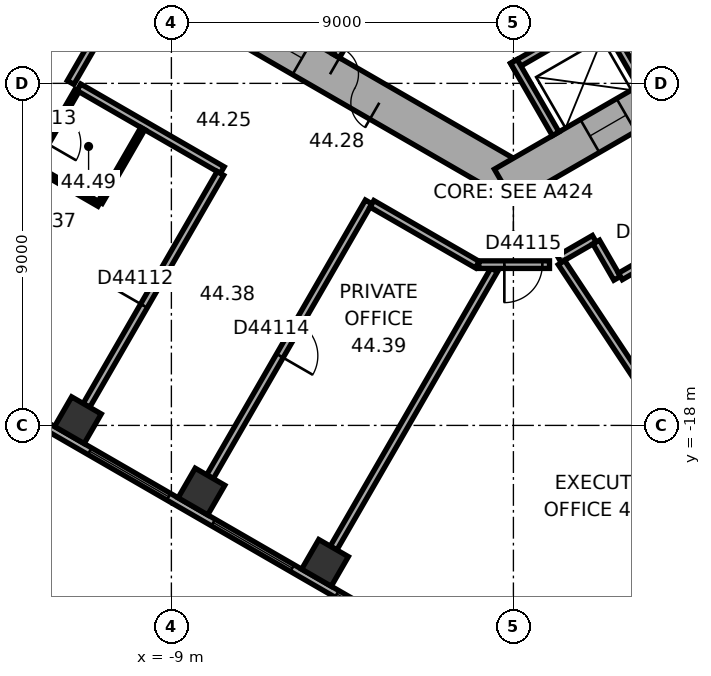
"""IFC4 building model, lengths in metres.
Left out: names, types, materials, properties, quantities, classifications, styles, units other than length and angle.
Written with IfcOpenShell. Run it as: python <this file> out.ifc"""

import sys

from ifc_helpers import new_model, si_unit, direction, frame, frame_2d, origin, origin_2d, place, context, subcontext, project, spatial, rectangle, extrude, element, fill, save


model = new_model("IFC4")
c1 = context("Model", 3, precision=1e-05, world=origin(), true_north=direction((0.0, 1.0)))
c2 = subcontext(c1, "Body", "Model", "MODEL_VIEW")
j1 = project(units=[si_unit("LENGTHUNIT", "METRE"), si_unit("PLANEANGLEUNIT", "RADIAN")], contexts=[c1])
p1 = place(None, origin())
s1 = spatial("IfcSite", under=j1, at=p1, CompositionType="ELEMENT")
p2 = place(p1, origin())
s2 = spatial("IfcBuilding", under=s1, at=p2, CompositionType="ELEMENT")
p3 = place(p2, frame((0.0, 0.0, 179.9)))
s3 = spatial("IfcBuildingStorey", under=s2, at=p3, CompositionType="ELEMENT", Elevation=179.9)
for number, where, z_axis, x_axis in (
    (1, (-11.46, -17.863, 0.0), (0.0, 0.0, 1.0), (0.866, -0.5, 0.0)),
    (2, (-8.208, -19.74, 0.0), (0.0, 0.0, 1.0), (0.866, -0.5, 0.0)),
    (3, (-4.958, -21.617, 0.0), (0.0, 0.0, 1.0), (0.866, -0.5, 0.0)),
):
    element("IfcColumn", number, at=place(p3, frame(where, z_axis=z_axis, x_axis=x_axis)), inside=s3, PredefinedType="COLUMN", context=c2, shape_type="SweptSolid", body=[
        extrude(rectangle(XDim=0.9, YDim=0.9, at=origin_2d()), origin(), (0.0, 0.0, 1.0), 3.7),
    ])
p4 = place(p3, frame((-10.25, -5.629, 0.0), z_axis=(0.0, 0.0, 1.0), x_axis=(0.866022616891, -0.50000482701, 0.0)))
e4 = element("IfcWall", 4, at=p4, inside=s3, PredefinedType="SHEAR", context=c2, shape_type="SweptSolid", body=[
    extrude(rectangle(XDim=12.125, YDim=1.0, at=frame_2d((6.062, 0.0))), origin(), (0.0, 0.0, 1.0), 3.7),
])
p5 = place(p4, frame((6.262, 0.0, 0.0)))
e5 = element("IfcOpeningElement", 5, at=p5, cuts=e4, PredefinedType="OPENING", context=c2, shape_type="SweptSolid", body=[
    extrude(rectangle(XDim=1.5, YDim=2.1, at=frame_2d((0.75, 1.05))), frame((0.0, 0.51, 0.0), z_axis=(0.0, -1.0, 0.0), x_axis=(1.0, 0.0, 0.0)), (0.0, 0.0, 1.0), 1.02),
])
p6 = place(p4, frame((1.712, 0.0, 0.0)))
e6 = element("IfcOpeningElement", 6, at=p6, cuts=e4, PredefinedType="OPENING", context=c2, shape_type="SweptSolid", body=[
    extrude(rectangle(XDim=1.1, YDim=2.1, at=frame_2d((0.55, 1.05))), frame((0.0, 0.51, 0.0), z_axis=(0.0, -1.0, 0.0), x_axis=(1.0, 0.0, 0.0)), (0.0, 0.0, 1.0), 1.02),
])
p7 = place(p4, frame((4.312, 0.0, 0.0)))
e7 = element("IfcOpeningElement", 7, at=p7, cuts=e4, PredefinedType="OPENING", context=c2, shape_type="SweptSolid", body=[
    extrude(rectangle(XDim=1.1, YDim=2.1, at=frame_2d((0.55, 1.05))), frame((0.0, 0.51, 0.0), z_axis=(0.0, -1.0, 0.0), x_axis=(1.0, 0.0, 0.0)), (0.0, 0.0, 1.0), 1.02),
])
p8 = place(p3, frame((-0.25, -11.691, 0.0), z_axis=(0.0, 0.0, 1.0), x_axis=(0.866022616891, 0.50000482701, 0.0)))
e8 = element("IfcWall", 8, at=p8, inside=s3, PredefinedType="SHEAR", context=c2, shape_type="SweptSolid", body=[
    extrude(rectangle(XDim=12.125, YDim=1.0, at=frame_2d((6.062, 0.0))), origin(), (0.0, 0.0, 1.0), 3.7),
])
p9 = place(p8, frame((2.612, 0.0, 0.0)))
e9 = element("IfcOpeningElement", 9, at=p9, cuts=e8, PredefinedType="OPENING", context=c2, shape_type="SweptSolid", body=[
    extrude(rectangle(XDim=1.1, YDim=2.1, at=frame_2d((0.55, 1.05))), frame((0.0, 0.51, 0.0), z_axis=(0.0, -1.0, 0.0), x_axis=(1.0, 0.0, 0.0)), (0.0, 0.0, 1.0), 1.02),
])
p10 = place(p8, frame((5.212, 0.0, 0.0)))
e10 = element("IfcOpeningElement", 10, at=p10, cuts=e8, PredefinedType="OPENING", context=c2, shape_type="SweptSolid", body=[
    extrude(rectangle(XDim=1.1, YDim=2.1, at=frame_2d((0.55, 1.05))), frame((0.0, 0.51, 0.0), z_axis=(0.0, -1.0, 0.0), x_axis=(1.0, 0.0, 0.0)), (0.0, 0.0, 1.0), 1.02),
])
p11 = place(p8, frame((7.812, 0.0, 0.0)))
e11 = element("IfcOpeningElement", 11, at=p11, cuts=e8, PredefinedType="OPENING", context=c2, shape_type="SweptSolid", body=[
    extrude(rectangle(XDim=1.1, YDim=2.1, at=frame_2d((0.55, 1.05))), frame((0.0, 0.51, 0.0), z_axis=(0.0, -1.0, 0.0), x_axis=(1.0, 0.0, 0.0)), (0.0, 0.0, 1.0), 1.02),
])
p12 = place(p3, frame((-18.789, -14.267, 0.0), z_axis=(0.0, 0.0, 1.0), x_axis=(0.866023315909, -0.500003616288, 0.0)))
e12 = element("IfcWall", 12, at=p12, inside=s3, PredefinedType="STANDARD", context=c2, shape_type="SweptSolid", body=[
    extrude(rectangle(XDim=20.044, YDim=0.2, at=frame_2d((10.022, 0.0))), origin(), (0.0, 0.0, 1.0), 3.7),
])
p13 = place(p12, frame((1.314, 0.0, 0.9)))
e13 = element("IfcOpeningElement", 13, at=p13, cuts=e12, PredefinedType="OPENING", context=c2, shape_type="SweptSolid", body=[
    extrude(rectangle(XDim=2.4, YDim=2.0, at=frame_2d((1.2, 1.0))), frame((0.0, 0.11, 0.0), z_axis=(0.0, -1.0, 0.0), x_axis=(1.0, 0.0, 0.0)), (0.0, 0.0, 1.0), 0.22),
])
p14 = place(p12, frame((5.069, 0.0, 0.9)))
e14 = element("IfcOpeningElement", 14, at=p14, cuts=e12, PredefinedType="OPENING", context=c2, shape_type="SweptSolid", body=[
    extrude(rectangle(XDim=2.4, YDim=2.0, at=frame_2d((1.2, 1.0))), frame((0.0, 0.11, 0.0), z_axis=(0.0, -1.0, 0.0), x_axis=(1.0, 0.0, 0.0)), (0.0, 0.0, 1.0), 0.22),
])
p15 = place(p12, frame((8.823, 0.0, 0.9)))
e15 = element("IfcOpeningElement", 15, at=p15, cuts=e12, PredefinedType="OPENING", context=c2, shape_type="SweptSolid", body=[
    extrude(rectangle(XDim=2.4, YDim=2.0, at=frame_2d((1.2, 1.0))), frame((0.0, 0.11, 0.0), z_axis=(0.0, -1.0, 0.0), x_axis=(1.0, 0.0, 0.0)), (0.0, 0.0, 1.0), 0.22),
])
p16 = place(p12, frame((12.577, 0.0, 0.9)))
e16 = element("IfcOpeningElement", 16, at=p16, cuts=e12, PredefinedType="OPENING", context=c2, shape_type="SweptSolid", body=[
    extrude(rectangle(XDim=2.4, YDim=2.0, at=frame_2d((1.2, 1.0))), frame((0.0, 0.11, 0.0), z_axis=(0.0, -1.0, 0.0), x_axis=(1.0, 0.0, 0.0)), (0.0, 0.0, 1.0), 0.22),
])
p17 = place(p12, frame((16.331, 0.0, 0.9)))
e17 = element("IfcOpeningElement", 17, at=p17, cuts=e12, PredefinedType="OPENING", context=c2, shape_type="SweptSolid", body=[
    extrude(rectangle(XDim=2.4, YDim=2.0, at=frame_2d((1.2, 1.0))), frame((0.0, 0.11, 0.0), z_axis=(0.0, -1.0, 0.0), x_axis=(1.0, 0.0, 0.0)), (0.0, 0.0, 1.0), 0.22),
])
p18 = place(p3, frame((2.911, -24.156, 0.0), z_axis=(0.0, 0.0, 1.0), x_axis=(0.833882163564, 0.551942512668, 0.0)))
e18 = element("IfcWall", 18, at=p18, inside=s3, PredefinedType="STANDARD", context=c2, shape_type="SweptSolid", body=[
    extrude(rectangle(XDim=20.044, YDim=0.2, at=frame_2d((10.022, 0.0))), origin(), (0.0, 0.0, 1.0), 3.7),
])
p19 = place(p18, frame((1.313, 0.0, 0.9)))
e19 = element("IfcOpeningElement", 19, at=p19, cuts=e18, PredefinedType="OPENING", context=c2, shape_type="SweptSolid", body=[
    extrude(rectangle(XDim=2.4, YDim=2.0, at=frame_2d((1.2, 1.0))), frame((0.0, 0.11, 0.0), z_axis=(0.0, -1.0, 0.0), x_axis=(1.0, 0.0, 0.0)), (0.0, 0.0, 1.0), 0.22),
])
p20 = place(p18, frame((5.067, 0.0, 0.9)))
e20 = element("IfcOpeningElement", 20, at=p20, cuts=e18, PredefinedType="OPENING", context=c2, shape_type="SweptSolid", body=[
    extrude(rectangle(XDim=2.4, YDim=2.0, at=frame_2d((1.2, 1.0))), frame((0.0, 0.11, 0.0), z_axis=(0.0, -1.0, 0.0), x_axis=(1.0, 0.0, 0.0)), (0.0, 0.0, 1.0), 0.22),
])
p21 = place(p18, frame((8.821, 0.0, 0.9)))
e21 = element("IfcOpeningElement", 21, at=p21, cuts=e18, PredefinedType="OPENING", context=c2, shape_type="SweptSolid", body=[
    extrude(rectangle(XDim=2.4, YDim=2.0, at=frame_2d((1.2, 1.0))), frame((0.0, 0.11, 0.0), z_axis=(0.0, -1.0, 0.0), x_axis=(1.0, 0.0, 0.0)), (0.0, 0.0, 1.0), 0.22),
])
p22 = place(p18, frame((12.575, 0.0, 0.9)))
e22 = element("IfcOpeningElement", 22, at=p22, cuts=e18, PredefinedType="OPENING", context=c2, shape_type="SweptSolid", body=[
    extrude(rectangle(XDim=2.4, YDim=2.0, at=frame_2d((1.2, 1.0))), frame((0.0, 0.11, 0.0), z_axis=(0.0, -1.0, 0.0), x_axis=(1.0, 0.0, 0.0)), (0.0, 0.0, 1.0), 0.22),
])
p23 = place(p18, frame((16.329, 0.0, 0.9)))
e23 = element("IfcOpeningElement", 23, at=p23, cuts=e18, PredefinedType="OPENING", context=c2, shape_type="SweptSolid", body=[
    extrude(rectangle(XDim=2.4, YDim=2.0, at=frame_2d((1.2, 1.0))), frame((0.0, 0.11, 0.0), z_axis=(0.0, -1.0, 0.0), x_axis=(1.0, 0.0, 0.0)), (0.0, 0.0, 1.0), 0.22),
])
p24 = place(p3, frame((-3.563, -6.372, 0.0), z_axis=(0.0, 0.0, 1.0), x_axis=(-0.499994660107, -0.866028486751, 0.0)))
e24 = element("IfcWall", 24, at=p24, inside=s3, PredefinedType="PARTITIONING", context=c2, shape_type="SweptSolid", body=[
    extrude(rectangle(XDim=2.2, YDim=0.2, at=frame_2d((1.1, 0.0))), origin(), (0.0, 0.0, 1.0), 3.42),
])
p25 = place(p3, frame((-0.024, -8.559, 0.0), z_axis=(0.0, 0.0, 1.0), x_axis=(0.866026010844, 0.49999894854, 0.0)))
e25 = element("IfcWall", 25, at=p25, inside=s3, PredefinedType="PARTITIONING", context=c2, shape_type="SweptSolid", body=[
    extrude(rectangle(XDim=8.0, YDim=0.2, at=frame_2d((4.0, 0.0))), origin(), (0.0, 0.0, 1.0), 3.42),
])
for number, where, z_axis, x_axis in (
    (26, (0.013, -8.422, 0.0), (0.0, 0.0, 1.0), (0.5, -0.866, 0.0)),
    (27, (2.264, -7.122, 0.0), (0.0, 0.0, 1.0), (0.5, -0.866, 0.0)),
):
    element("IfcWall", number, at=place(p3, frame(where, z_axis=z_axis, x_axis=x_axis)), inside=s3, PredefinedType="PARTITIONING", context=c2, shape_type="SweptSolid", body=[
        extrude(rectangle(XDim=2.2, YDim=0.2, at=frame_2d((1.1, 0.0))), origin(), (0.0, 0.0, 1.0), 3.42),
    ])
p26 = place(p3, frame((-12.635, -11.182, 0.0), z_axis=(0.0, 0.0, 1.0), x_axis=(0.499952165731, 0.866053019151, 0.0)))
e28 = element("IfcWall", 28, at=p26, inside=s3, PredefinedType="PARTITIONING", context=c2, shape_type="SweptSolid", body=[
    extrude(rectangle(XDim=2.3, YDim=0.12, at=frame_2d((1.15, 0.0))), origin(), (0.0, 0.0, 1.0), 3.42),
])
p27 = place(p26, frame((0.7, 0.0, 0.0)))
e29 = element("IfcOpeningElement", 29, at=p27, cuts=e28, PredefinedType="OPENING", context=c2, shape_type="SweptSolid", body=[
    extrude(rectangle(XDim=0.9, YDim=2.1, at=frame_2d((0.45, 1.05))), frame((0.0, 0.07, 0.0), z_axis=(0.0, -1.0, 0.0), x_axis=(1.0, 0.0, 0.0)), (0.0, 0.0, 1.0), 0.14),
])
p28 = place(p3, frame((-11.435, -9.103, 0.0), z_axis=(0.0, 0.0, 1.0), x_axis=(0.866007399799, -0.500031182522, 0.0)))
e30 = element("IfcWall", 30, at=p28, inside=s3, PredefinedType="PARTITIONING", context=c2, shape_type="SweptSolid", body=[
    extrude(rectangle(XDim=4.358, YDim=0.2, at=frame_2d((2.179, 0.0))), origin(), (0.0, 0.0, 1.0), 3.42),
])
p29 = place(p3, frame((-11.235, -17.474, 0.0), z_axis=(0.0, 0.0, 1.0), x_axis=(0.500009260695, 0.866020057054, 0.0)))
e31 = element("IfcWall", 31, at=p29, inside=s3, PredefinedType="PARTITIONING", context=c2, shape_type="SweptSolid", body=[
    extrude(rectangle(XDim=7.049, YDim=0.2, at=frame_2d((3.524, 0.0))), origin(), (0.0, 0.0, 1.0), 2.87),
])
p30 = place(p29, frame((3.024, 0.0, 0.0)))
e32 = element("IfcOpeningElement", 32, at=p30, cuts=e31, PredefinedType="OPENING", context=c2, shape_type="SweptSolid", body=[
    extrude(rectangle(XDim=1.0, YDim=2.1, at=frame_2d((0.5, 1.05))), frame((0.0, 0.11, 0.0), z_axis=(0.0, -1.0, 0.0), x_axis=(1.0, 0.0, 0.0)), (0.0, 0.0, 1.0), 0.22),
])
p31 = place(p3, frame((-11.101, -8.025, 0.0), z_axis=(0.0, 0.0, 1.0), x_axis=(-0.500074377092, -0.865982457891, 0.0)))
e33 = element("IfcWall", 33, at=p31, inside=s3, PredefinedType="PARTITIONING", context=c2, shape_type="SweptSolid", body=[
    extrude(rectangle(XDim=1.101, YDim=0.2, at=frame_2d((0.55, 0.0))), origin(), (0.0, 0.0, 1.0), 3.42),
])
p32 = place(p3, frame((-10.903, -12.182, 0.0), z_axis=(0.0, 0.0, 1.0), x_axis=(-0.866011626733, 0.500023861795, 0.0)))
e34 = element("IfcWall", 34, at=p32, inside=s3, PredefinedType="PARTITIONING", context=c2, shape_type="SweptSolid", body=[
    extrude(rectangle(XDim=1.94, YDim=0.12, at=frame_2d((0.97, 0.0))), origin(), (0.0, 0.0, 1.0), 3.42),
])
p33 = place(p3, frame((-9.753, -10.19, 0.0), z_axis=(0.0, 0.0, 1.0), x_axis=(-0.49994888933, -0.866054910533, 0.0)))
e35 = element("IfcWall", 35, at=p33, inside=s3, PredefinedType="PARTITIONING", context=c2, shape_type="SweptSolid", body=[
    extrude(rectangle(XDim=2.24, YDim=0.12, at=frame_2d((1.12, 0.0))), origin(), (0.0, 0.0, 1.0), 3.42),
])
p34 = place(p3, frame((-7.984, -19.351, 0.0), z_axis=(0.0, 0.0, 1.0), x_axis=(0.500010139422, 0.866019549707, 0.0)))
e36 = element("IfcWall", 36, at=p34, inside=s3, PredefinedType="PARTITIONING", context=c2, shape_type="SweptSolid", body=[
    extrude(rectangle(XDim=8.35, YDim=0.2, at=frame_2d((4.175, 0.0))), origin(), (0.0, 0.0, 1.0), 3.42),
])
p35 = place(p34, frame((3.675, 0.0, 0.0)))
e37 = element("IfcOpeningElement", 37, at=p35, cuts=e36, PredefinedType="OPENING", context=c2, shape_type="SweptSolid", body=[
    extrude(rectangle(XDim=1.0, YDim=2.1, at=frame_2d((0.5, 1.05))), frame((0.0, 0.11, 0.0), z_axis=(0.0, -1.0, 0.0), x_axis=(1.0, 0.0, 0.0)), (0.0, 0.0, 1.0), 0.22),
])
p36 = place(p3, frame((-4.732, -21.228, 0.0), z_axis=(0.0, 0.0, 1.0), x_axis=(0.500000843414, 0.866024916838, 0.0)))
e38 = element("IfcWall", 38, at=p36, inside=s3, PredefinedType="PARTITIONING", context=c2, shape_type="SweptSolid", body=[
    extrude(rectangle(XDim=8.452, YDim=0.2, at=frame_2d((4.226, 0.0))), origin(), (0.0, 0.0, 1.0), 3.42),
])
p37 = place(p3, frame((-3.722, -12.169, 0.0), z_axis=(0.0, 0.0, 1.0), x_axis=(0.866033163891, -0.499986558861, 0.0)))
e39 = element("IfcWall", 39, at=p37, inside=s3, PredefinedType="PARTITIONING", context=c2, shape_type="SweptSolid", body=[
    extrude(rectangle(XDim=3.201, YDim=0.2, at=frame_2d((1.6, 0.0))), origin(), (0.0, 0.0, 1.0), 3.42),
])
p38 = place(p3, frame((-0.91, -13.77, 0.0), z_axis=(0.0, 0.0, 1.0), x_axis=(1.0, 0.0, 0.0)))
e40 = element("IfcWall", 40, at=p38, inside=s3, PredefinedType="PARTITIONING", context=c2, shape_type="SweptSolid", body=[
    extrude(rectangle(XDim=1.86, YDim=0.2, at=frame_2d((0.93, 0.0))), origin(), (0.0, 0.0, 1.0), 3.42),
])
p39 = place(p38, frame((0.672, 0.0, 0.0)))
e41 = element("IfcOpeningElement", 41, at=p39, cuts=e40, PredefinedType="OPENING", context=c2, shape_type="SweptSolid", body=[
    extrude(rectangle(XDim=1.0, YDim=2.1, at=frame_2d((0.5, 1.05))), frame((0.0, 0.11, 0.0), z_axis=(0.0, -1.0, 0.0), x_axis=(1.0, 0.0, 0.0)), (0.0, 0.0, 1.0), 0.22),
])
p40 = place(p3, frame((1.204, -13.623, 0.0), z_axis=(0.0, 0.0, 1.0), x_axis=(0.866040989419, 0.499973003918, 0.0)))
e42 = element("IfcWall", 42, at=p40, inside=s3, PredefinedType="PARTITIONING", context=c2, shape_type="SweptSolid", body=[
    extrude(rectangle(XDim=1.068, YDim=0.2, at=frame_2d((0.534, 0.0))), origin(), (0.0, 0.0, 1.0), 3.42),
])
p41 = place(p3, frame((2.179, -13.176, 0.0), z_axis=(0.0, 0.0, 1.0), x_axis=(0.499978356969, -0.866037899034, 0.0)))
e43 = element("IfcWall", 43, at=p41, inside=s3, PredefinedType="PARTITIONING", context=c2, shape_type="SweptSolid", body=[
    extrude(rectangle(XDim=1.101, YDim=0.2, at=frame_2d((0.551, 0.0))), origin(), (0.0, 0.0, 1.0), 3.42),
])
p42 = place(p3, frame((2.816, -14.079, 0.0), z_axis=(0.0, 0.0, 1.0), x_axis=(0.866008705299, 0.50002892151, 0.0)))
e44 = element("IfcWall", 44, at=p42, inside=s3, PredefinedType="PARTITIONING", context=c2, shape_type="SweptSolid", body=[
    extrude(rectangle(XDim=2.666, YDim=0.2, at=frame_2d((1.333, 0.0))), origin(), (0.0, 0.0, 1.0), 3.42),
])
p43 = place(p42, frame((0.833, 0.0, 0.0)))
e45 = element("IfcOpeningElement", 45, at=p43, cuts=e44, PredefinedType="OPENING", context=c2, shape_type="SweptSolid", body=[
    extrude(rectangle(XDim=1.0, YDim=2.1, at=frame_2d((0.5, 1.05))), frame((0.0, 0.11, 0.0), z_axis=(0.0, -1.0, 0.0), x_axis=(1.0, 0.0, 0.0)), (0.0, 0.0, 1.0), 0.22),
])
p44 = place(p3, frame((6.02, -20.899, 0.0), z_axis=(0.0, 0.0, 1.0), x_axis=(-0.551943990108, 0.833881185651, 0.0)))
e46 = element("IfcWall", 46, at=p44, inside=s3, PredefinedType="PARTITIONING", context=c2, shape_type="SweptSolid", body=[
    extrude(rectangle(XDim=8.615, YDim=0.2, at=frame_2d((4.308, 0.0))), origin(), (0.0, 0.0, 1.0), 3.42),
])
p45 = place(p15, origin())
e47 = element("IfcWindow", 47, at=p45, inside=s3, PartitioningType="SINGLE_PANEL", PredefinedType="WINDOW", context=c2, shape_type="SweptSolid", body=[
    extrude(rectangle(XDim=2.4, YDim=2.0, at=frame_2d((1.2, 1.0))), frame((0.0, 0.03, 0.0), z_axis=(0.0, -1.0, 0.0), x_axis=(1.0, 0.0, 0.0)), (0.0, 0.0, 1.0), 0.06),
])
fill(e15, e47)
p46 = place(p16, origin())
e48 = element("IfcWindow", 48, at=p46, inside=s3, PartitioningType="SINGLE_PANEL", PredefinedType="WINDOW", context=c2, shape_type="SweptSolid", body=[
    extrude(rectangle(XDim=2.4, YDim=2.0, at=frame_2d((1.2, 1.0))), frame((0.0, 0.03, 0.0), z_axis=(0.0, -1.0, 0.0), x_axis=(1.0, 0.0, 0.0)), (0.0, 0.0, 1.0), 0.06),
])
fill(e16, e48)
p47 = place(p17, origin())
e49 = element("IfcWindow", 49, at=p47, inside=s3, PartitioningType="SINGLE_PANEL", PredefinedType="WINDOW", context=c2, shape_type="SweptSolid", body=[
    extrude(rectangle(XDim=2.4, YDim=2.0, at=frame_2d((1.2, 1.0))), frame((0.0, 0.03, 0.0), z_axis=(0.0, -1.0, 0.0), x_axis=(1.0, 0.0, 0.0)), (0.0, 0.0, 1.0), 0.06),
])
fill(e17, e49)
p48 = place(p5, origin())
e50 = element("IfcDoor", 50, at=p48, inside=s3, OperationType="DOUBLE_DOOR_SINGLE_SWING", PredefinedType="DOOR", context=c2, shape_type="SweptSolid", body=[
    extrude(rectangle(XDim=1.5, YDim=2.1, at=frame_2d((0.75, 1.05))), frame((0.0, 0.025, 0.0), z_axis=(0.0, -1.0, 0.0), x_axis=(1.0, 0.0, 0.0)), (0.0, 0.0, 1.0), 0.05),
])
fill(e5, e50)
p49 = place(p7, origin())
e51 = element("IfcDoor", 51, at=p49, inside=s3, OperationType="DOUBLE_DOOR_SLIDING", PredefinedType="DOOR", context=c2, shape_type="SweptSolid", body=[
    extrude(rectangle(XDim=1.1, YDim=2.1, at=frame_2d((0.55, 1.05))), frame((0.0, 0.025, 0.0), z_axis=(0.0, -1.0, 0.0), x_axis=(1.0, 0.0, 0.0)), (0.0, 0.0, 1.0), 0.05),
])
fill(e7, e51)
p50 = place(p9, origin())
e52 = element("IfcDoor", 52, at=p50, inside=s3, OperationType="DOUBLE_DOOR_SLIDING", PredefinedType="DOOR", context=c2, shape_type="SweptSolid", body=[
    extrude(rectangle(XDim=1.1, YDim=2.1, at=frame_2d((0.55, 1.05))), frame((0.0, 0.025, 0.0), z_axis=(0.0, -1.0, 0.0), x_axis=(1.0, 0.0, 0.0)), (0.0, 0.0, 1.0), 0.05),
])
fill(e9, e52)
p51 = place(p30, origin())
e53 = element("IfcDoor", 53, at=p51, inside=s3, OperationType="SINGLE_SWING_LEFT", PredefinedType="DOOR", context=c2, shape_type="SweptSolid", body=[
    extrude(rectangle(XDim=1.0, YDim=2.1, at=frame_2d((0.5, 1.05))), frame((0.0, 0.025, 0.0), z_axis=(0.0, -1.0, 0.0), x_axis=(1.0, 0.0, 0.0)), (0.0, 0.0, 1.0), 0.05),
])
fill(e32, e53)
p52 = place(p27, origin())
e54 = element("IfcDoor", 54, at=p52, inside=s3, OperationType="SINGLE_SWING_LEFT", PredefinedType="DOOR", context=c2, shape_type="SweptSolid", body=[
    extrude(rectangle(XDim=0.9, YDim=2.1, at=frame_2d((0.45, 1.05))), frame((0.0, 0.025, 0.0), z_axis=(0.0, -1.0, 0.0), x_axis=(1.0, 0.0, 0.0)), (0.0, 0.0, 1.0), 0.05),
])
fill(e29, e54)
p53 = place(p35, origin())
e55 = element("IfcDoor", 55, at=p53, inside=s3, OperationType="SINGLE_SWING_LEFT", PredefinedType="DOOR", context=c2, shape_type="SweptSolid", body=[
    extrude(rectangle(XDim=1.0, YDim=2.1, at=frame_2d((0.5, 1.05))), frame((0.0, 0.025, 0.0), z_axis=(0.0, -1.0, 0.0), x_axis=(1.0, 0.0, 0.0)), (0.0, 0.0, 1.0), 0.05),
])
fill(e37, e55)
p54 = place(p39, origin())
e56 = element("IfcDoor", 56, at=p54, inside=s3, OperationType="SINGLE_SWING_LEFT", PredefinedType="DOOR", context=c2, shape_type="SweptSolid", body=[
    extrude(rectangle(XDim=1.0, YDim=2.1, at=frame_2d((0.5, 1.05))), frame((0.0, 0.025, 0.0), z_axis=(0.0, -1.0, 0.0), x_axis=(1.0, 0.0, 0.0)), (0.0, 0.0, 1.0), 0.05),
])
fill(e41, e56)
save(model, sys.argv[1])
